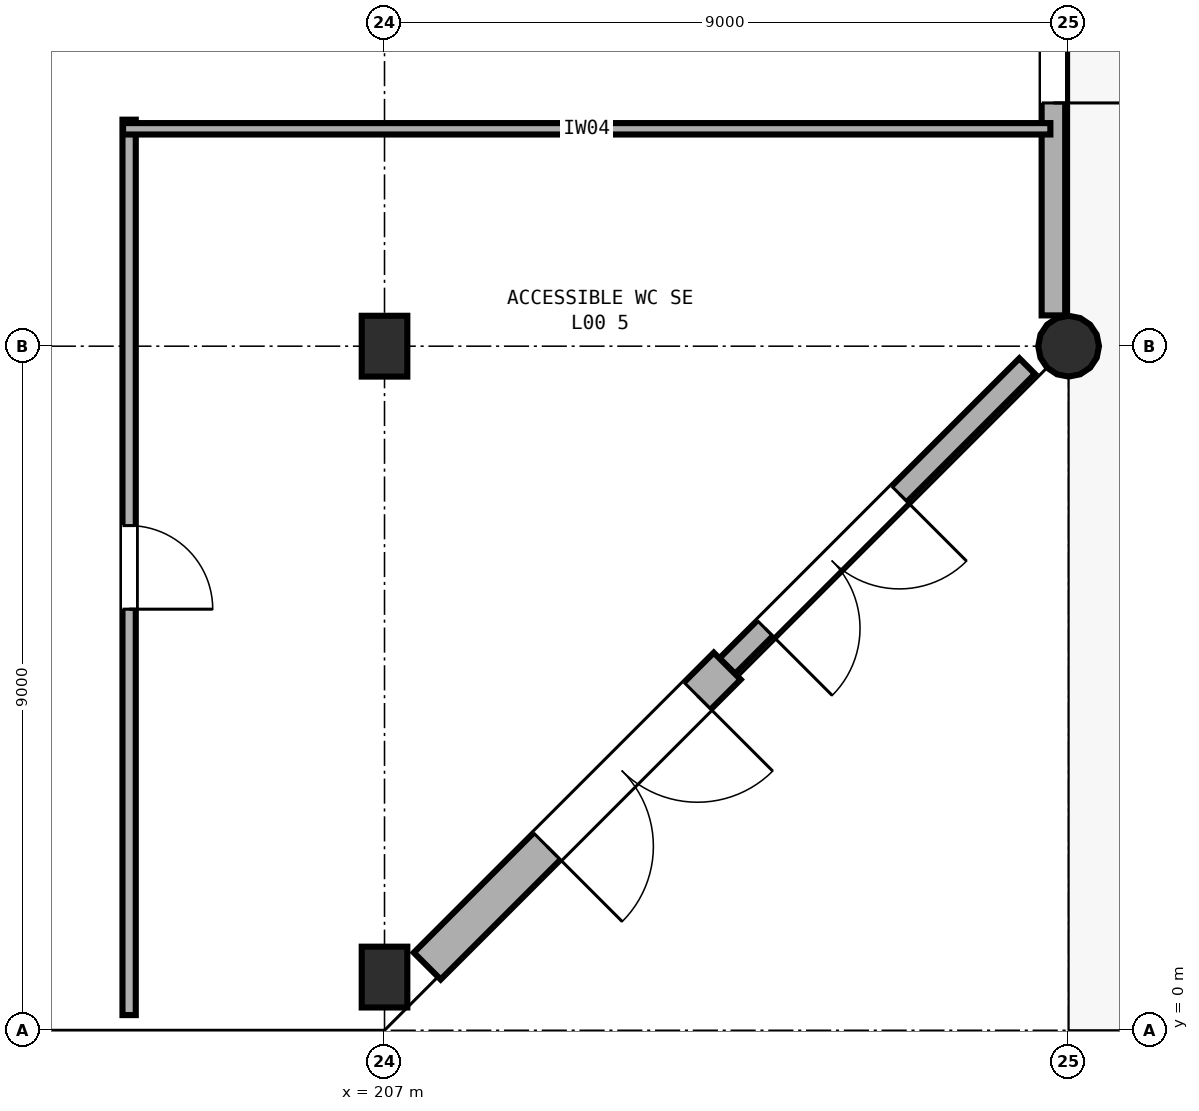
"""IFC4 building model, lengths in metres.
Left out: names, types, materials, properties, quantities, classifications, styles, units other than length and angle.
Written with IfcOpenShell. Run it as: python <this file> out.ifc"""

import sys

from ifc_helpers import new_model, si_unit, direction, frame, frame_2d, origin, origin_2d, place, context, subcontext, project, spatial, rectangle, circle, extrude, element, fill, save


model = new_model("IFC4")
c1 = context("Model", 3, precision=1e-05, world=origin(), true_north=direction((0.0, 1.0)))
c2 = subcontext(c1, "Body", "Model", "MODEL_VIEW")
j1 = project(units=[si_unit("LENGTHUNIT", "METRE"), si_unit("PLANEANGLEUNIT", "RADIAN")], contexts=[c1])
p1 = place(None, origin())
s1 = spatial("IfcSite", under=j1, at=p1, CompositionType="ELEMENT")
p2 = place(p1, origin())
s2 = spatial("IfcBuilding", under=s1, at=p2, CompositionType="ELEMENT")
p3 = place(p2, origin())
s3 = spatial("IfcBuildingStorey", under=s2, at=p3, CompositionType="ELEMENT", Elevation=0.0)
for number, where, z_axis, x_axis in (
    (1, (207.0, 0.7, 0.0), (0.0, 0.0, 1.0), (1.0, 0.0, 0.0)),
    (2, (207.0, 9.0, 0.0), (0.0, 0.0, 1.0), (1.0, 0.0, 0.0)),
):
    element("IfcColumn", number, at=place(p3, frame(where, z_axis=z_axis, x_axis=x_axis)), inside=s3, PredefinedType="COLUMN", context=c2, shape_type="SweptSolid", body=[
        extrude(rectangle(XDim=0.6, YDim=0.8, at=origin_2d()), origin(), (0.0, 0.0, 1.0), 4.8),
    ])
p4 = place(p3, frame((216.0, 9.0, 0.0), z_axis=(0.0, 0.0, 1.0), x_axis=(1.0, 0.0, 0.0)))
e3 = element("IfcColumn", 3, at=p4, inside=s3, PredefinedType="COLUMN", context=c2, shape_type="SweptSolid", body=[
    extrude(circle(Radius=0.4, at=origin_2d()), origin(), (0.0, 0.0, 1.0), 4.8),
])
p5 = place(p3, frame((215.8, 17.595, 0.0), z_axis=(0.0, 0.0, 1.0), x_axis=(0.0, -1.0, 0.0)))
e4 = element("IfcWall", 4, at=p5, inside=s3, PredefinedType="SOLIDWALL", context=c2, shape_type="SweptSolid", body=[
    extrude(rectangle(XDim=8.19, YDim=0.31, at=frame_2d((4.095, 0.0))), origin(), (0.0, 0.0, 1.0), 3.58),
])
p6 = place(p5, frame((2.795, 0.0, 0.0)))
e5 = element("IfcOpeningElement", 5, at=p6, cuts=e4, PredefinedType="OPENING", context=c2, shape_type="SweptSolid", body=[
    extrude(rectangle(XDim=2.6, YDim=2.35, at=frame_2d((1.3, 1.175))), frame((0.0, 0.165, 0.0), z_axis=(0.0, -1.0, 0.0), x_axis=(1.0, 0.0, 0.0)), (0.0, 0.0, 1.0), 0.33),
])
p7 = place(p3, frame((215.455, 8.738, 0.0), z_axis=(0.0, 0.0, 1.0), x_axis=(-0.7071286530614815, -0.7070849086350626, 0.0)))
e6 = element("IfcWall", 6, at=p7, inside=s3, PredefinedType="SOLIDWALL", context=c2, shape_type="SweptSolid", body=[
    extrude(rectangle(XDim=5.581, YDim=0.29, at=frame_2d((2.791, 0.0))), origin(), (0.0, 0.0, 1.0), 3.58),
])
p8 = place(p7, frame((2.378, 0.0, 0.0)))
e7 = element("IfcOpeningElement", 7, at=p8, cuts=e6, PredefinedType="OPENING", context=c2, shape_type="SweptSolid", body=[
    extrude(rectangle(XDim=2.5, YDim=2.35, at=frame_2d((1.25, 1.175))), frame((0.0, 0.155, 0.0), z_axis=(0.0, -1.0, 0.0), x_axis=(1.0, 0.0, 0.0)), (0.0, 0.0, 1.0), 0.31),
])
p9 = place(p3, frame((211.509, 4.792, 0.0), z_axis=(0.0, 0.0, 1.0), x_axis=(-0.7071067811865476, -0.7071067811865476, 0.0)))
e8 = element("IfcWall", 8, at=p9, inside=s3, PredefinedType="SOLIDWALL", context=c2, shape_type="SweptSolid", body=[
    extrude(rectangle(XDim=5.581, YDim=0.5, at=frame_2d((2.791, 0.0))), origin(), (0.0, 0.0, 1.0), 3.58),
])
p10 = place(p9, frame((0.553, 0.0, 0.0)))
e9 = element("IfcOpeningElement", 9, at=p10, cuts=e8, PredefinedType="OPENING", context=c2, shape_type="SweptSolid", body=[
    extrude(rectangle(XDim=2.8, YDim=2.4, at=frame_2d((1.4, 1.2))), frame((0.0, 0.26, 0.0), z_axis=(0.0, -1.0, 0.0), x_axis=(1.0, 0.0, 0.0)), (0.0, 0.0, 1.0), 0.52),
])
p11 = place(p3, frame((206.695, 0.2, 0.0), z_axis=(0.0, 0.0, 1.0), x_axis=(-1.0, 0.0, 0.0)))
e10 = element("IfcWall", 10, at=p11, inside=s3, PredefinedType="SOLIDWALL", context=c2, shape_type="SweptSolid", body=[
    extrude(rectangle(XDim=8.39, YDim=0.48, at=frame_2d((4.195, 0.0))), origin(), (0.0, 0.0, 1.0), 3.58),
])
p12 = place(p3, frame((203.64, 11.98, 0.0), z_axis=(0.0, 0.0, 1.0), x_axis=(0.0, -1.0, 0.0)))
e11 = element("IfcWall", 11, at=p12, inside=s3, PredefinedType="PARTITIONING", context=c2, shape_type="SweptSolid", body=[
    extrude(rectangle(XDim=11.78, YDim=0.175, at=frame_2d((5.89, 0.0))), origin(), (0.0, 0.0, 1.0), 3.28),
])
p13 = place(p12, frame((5.34, 0.0, 0.0)))
e12 = element("IfcOpeningElement", 12, at=p13, cuts=e11, PredefinedType="OPENING", context=c2, shape_type="SweptSolid", body=[
    extrude(rectangle(XDim=1.1, YDim=2.1, at=frame_2d((0.55, 1.05))), frame((0.0, 0.097, 0.0), z_axis=(0.0, -1.0, 0.0), x_axis=(1.0, 0.0, 0.0)), (0.0, 0.0, 1.0), 0.195),
])
p14 = place(p3, frame((203.56, 11.86, 0.0), z_axis=(0.0, 0.0, 1.0), x_axis=(1.0, 0.0, 0.0)))
e13 = element("IfcWall", 13, at=p14, inside=s3, PredefinedType="PARTITIONING", context=c2, shape_type="SweptSolid", body=[
    extrude(rectangle(XDim=12.2, YDim=0.15, at=frame_2d((6.1, 0.0))), origin(), (0.0, 0.0, 1.0), 3.28),
])
p15 = place(p6, origin())
e14 = element("IfcDoor", 14, at=p15, inside=s3, OperationType="DOUBLE_DOOR_SINGLE_SWING", PredefinedType="DOOR", context=c2, shape_type="SweptSolid", body=[
    extrude(rectangle(XDim=2.6, YDim=2.35, at=frame_2d((1.3, 1.175))), frame((0.0, 0.025, 0.0), z_axis=(0.0, -1.0, 0.0), x_axis=(1.0, 0.0, 0.0)), (0.0, 0.0, 1.0), 0.05),
])
fill(e5, e14)
p16 = place(p8, origin())
e15 = element("IfcDoor", 15, at=p16, inside=s3, OperationType="DOUBLE_DOOR_SINGLE_SWING", PredefinedType="DOOR", context=c2, shape_type="SweptSolid", body=[
    extrude(rectangle(XDim=2.5, YDim=2.35, at=frame_2d((1.25, 1.175))), frame((0.0, 0.025, 0.0), z_axis=(0.0, -1.0, 0.0), x_axis=(1.0, 0.0, 0.0)), (0.0, 0.0, 1.0), 0.05),
])
fill(e7, e15)
p17 = place(p10, origin())
e16 = element("IfcDoor", 16, at=p17, inside=s3, OperationType="DOUBLE_DOOR_SINGLE_SWING", PredefinedType="DOOR", context=c2, shape_type="SweptSolid", body=[
    extrude(rectangle(XDim=2.8, YDim=2.4, at=frame_2d((1.4, 1.2))), frame((0.0, 0.025, 0.0), z_axis=(0.0, -1.0, 0.0), x_axis=(1.0, 0.0, 0.0)), (0.0, 0.0, 1.0), 0.05),
])
fill(e9, e16)
p18 = place(p13, origin())
e17 = element("IfcDoor", 17, at=p18, inside=s3, OperationType="SINGLE_SWING_RIGHT", PredefinedType="DOOR", context=c2, shape_type="SweptSolid", body=[
    extrude(rectangle(XDim=1.1, YDim=2.1, at=frame_2d((0.55, 1.05))), frame((0.0, 0.025, 0.0), z_axis=(0.0, -1.0, 0.0), x_axis=(1.0, 0.0, 0.0)), (0.0, 0.0, 1.0), 0.05),
])
fill(e12, e17)
save(model, sys.argv[1])
